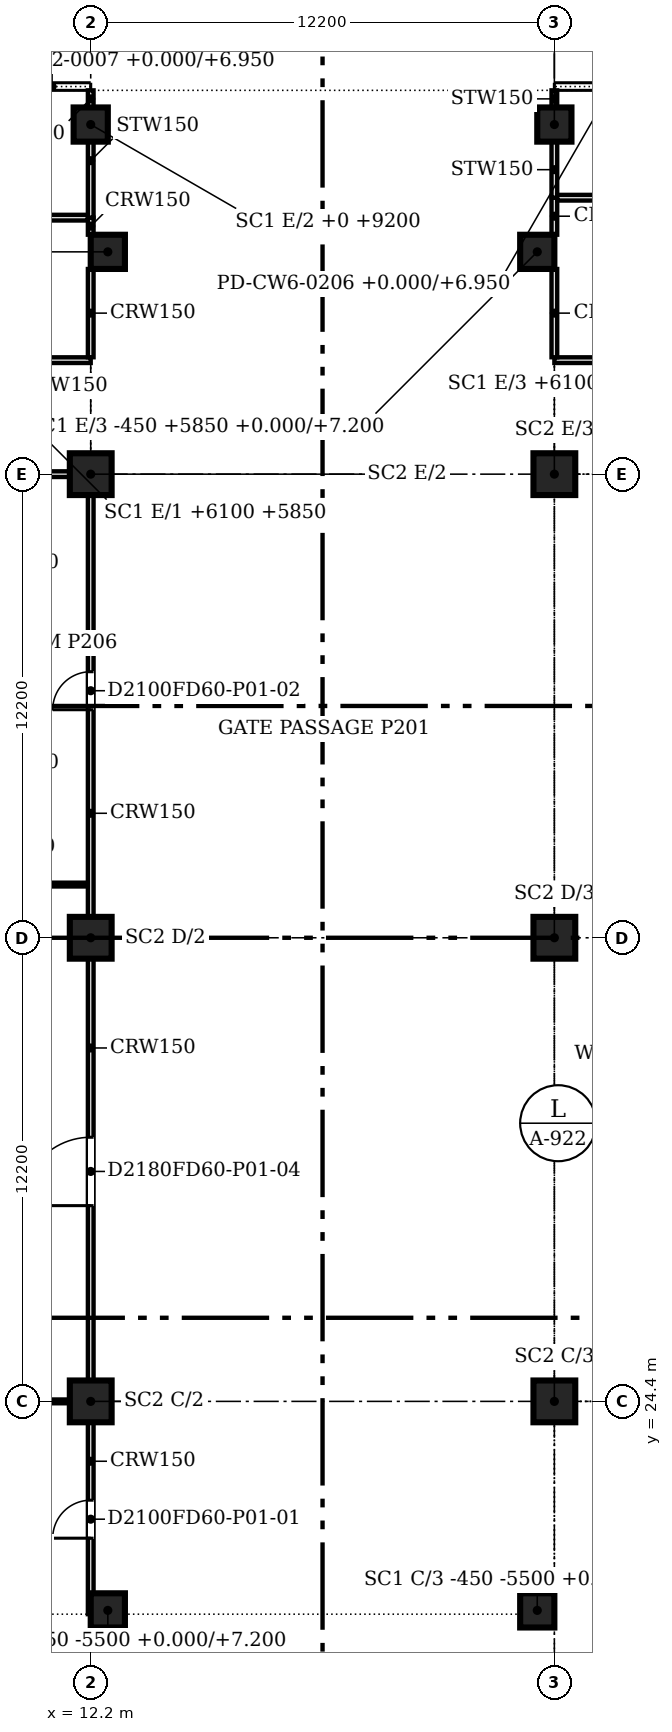
"""IFC4 building model, lengths in metres.
Left out: names, types, materials, properties, quantities, classifications, styles, units other than length and angle.
Written with IfcOpenShell. Run it as: python <this file> out.ifc"""

import sys

from ifc_helpers import new_model, si_unit, direction, frame, frame_2d, origin, origin_2d, place, context, subcontext, project, spatial, rectangle, extrude, faceted_brep, source, transform, mapped, element, fill, save


model = new_model("IFC4")
c1 = context("Model", 3, precision=1e-05, world=origin(), true_north=direction((0.0, 1.0)))
c2 = subcontext(c1, "Body", "Model", "MODEL_VIEW")
j1 = project(units=[si_unit("LENGTHUNIT", "METRE"), si_unit("PLANEANGLEUNIT", "RADIAN")], contexts=[c1])
p1 = place(None, origin())
s1 = spatial("IfcSite", under=j1, at=p1, CompositionType="ELEMENT")
p2 = place(p1, origin())
s2 = spatial("IfcBuilding", under=s1, at=p2, CompositionType="ELEMENT")
p3 = place(p2, origin())
s3 = spatial("IfcBuildingStorey", under=s2, at=p3, CompositionType="ELEMENT", Elevation=0.0)
for number, where, z_axis, x_axis in (
    (1, (12.65, 54.65, 0.0), (0.0, 0.0, 1.0), (1.0, 0.0, 0.0)),
    (2, (23.95, 54.65, 0.0), (0.0, 0.0, 1.0), (1.0, 0.0, 0.0)),
):
    element("IfcColumn", number, at=place(p3, frame(where, z_axis=z_axis, x_axis=x_axis)), inside=s3, PredefinedType="COLUMN", context=c2, shape_type="SweptSolid", body=[
        extrude(rectangle(XDim=0.9, YDim=0.9, at=origin_2d()), origin(), (0.0, 0.0, 1.0), 7.2),
    ])
for number, where, z_axis, x_axis in (
    (3, (12.2, 24.4, 0.0), (0.0, 0.0, 1.0), (1.0, 0.0, 0.0)),
    (4, (12.2, 36.6, 0.0), (0.0, 0.0, 1.0), (1.0, 0.0, 0.0)),
    (5, (12.2, 48.8, 0.0), (0.0, 0.0, 1.0), (1.0, 0.0, 0.0)),
    (6, (24.4, 24.4, 0.0), (0.0, 0.0, 1.0), (1.0, 0.0, 0.0)),
    (7, (24.4, 36.6, 0.0), (0.0, 0.0, 1.0), (1.0, 0.0, 0.0)),
    (8, (24.4, 48.8, 0.0), (0.0, 0.0, 1.0), (1.0, 0.0, 0.0)),
):
    element("IfcColumn", number, at=place(p3, frame(where, z_axis=z_axis, x_axis=x_axis)), inside=s3, PredefinedType="COLUMN", context=c2, shape_type="SweptSolid", body=[
        extrude(rectangle(XDim=1.1, YDim=1.1, at=origin_2d()), origin(), (0.0, 0.0, 1.0), 6.95),
    ])
for number, where, z_axis, x_axis in (
    (9, (12.2, 58.0, 0.0), (0.0, 0.0, 1.0), (1.0, 0.0, 0.0)),
    (10, (24.4, 58.0, 0.0), (0.0, 0.0, 1.0), (1.0, 0.0, 0.0)),
):
    element("IfcColumn", number, at=place(p3, frame(where, z_axis=z_axis, x_axis=x_axis)), inside=s3, PredefinedType="COLUMN", context=c2, shape_type="SweptSolid", body=[
        extrude(rectangle(XDim=0.9, YDim=0.9, at=origin_2d()), origin(), (0.0, 0.0, 1.0), 6.95),
    ])
for number, where, z_axis, x_axis in (
    (11, (12.65, 18.9, 0.0), (0.0, 0.0, 1.0), (1.0, 0.0, 0.0)),
    (12, (23.95, 18.9, 0.0), (0.0, 0.0, 1.0), (1.0, 0.0, 0.0)),
):
    element("IfcColumn", number, at=place(p3, frame(where, z_axis=z_axis, x_axis=x_axis)), inside=s3, PredefinedType="COLUMN", context=c2, shape_type="SweptSolid", body=[
        extrude(rectangle(XDim=0.9, YDim=0.9, at=origin_2d()), origin(), (0.0, 0.0, 1.0), 7.2),
    ])
p4 = place(p2, frame((0.0, 0.0, 7.2)))
s4 = spatial("IfcBuildingStorey", under=s2, at=p4, CompositionType="ELEMENT", Elevation=7.2)
m1 = source(origin(), c2, "Body", "Brep", [
    faceted_brep([(0.0, -0.25, 0.0), (6.053, -0.25, 0.0), (6.053, -0.25, 16.8), (0.0, -0.25, 16.8), (0.047, 0.25, 16.8), (6.053, 0.25, 16.8), (6.053, 0.25, 0.0), (0.047, 0.25, 0.0), (0.0, 0.0, 0.0), (0.0, 0.0, 16.8)], [[[0, 1, 2, 3]], [[4, 5, 6, 7]], [[7, 6, 1, 0, 8]], [[5, 4, 9, 3, 2]], [[8, 0, 3, 9]], [[7, 8, 9, 4]], [[1, 6, 5, 2]]]),
])
p5 = place(p4, frame((6.146, 18.55, -7.2), z_axis=(0.0, 0.0, 1.0), x_axis=(1.0, 0.0, 0.0)))
e13 = element("IfcWall", 13, at=p5, inside=s4, PredefinedType="SOLIDWALL", context=c2, shape_type="MappedRepresentation", body=[
    mapped(m1, transform((0.0, 0.0, 0.0), scale=1.0)),
])
p6 = place(p3, frame((12.2, 18.8, 0.0), z_axis=(0.0, 0.0, 1.0), x_axis=(0.0, 1.0, 0.0)))
e14 = element("IfcWall", 14, at=p6, inside=s3, PredefinedType="PARTITIONING", context=c2, shape_type="SweptSolid", body=[
    extrude(rectangle(XDim=5.049, YDim=0.15, at=frame_2d((2.524, 0.0))), origin(), (0.0, 0.0, 1.0), 6.115),
])
m2 = source(origin(), c2, "Body", "SweptSolid", [
    extrude(rectangle(XDim=1.0, YDim=2.1, at=frame_2d((0.5, 1.05))), frame((0.0, 0.085, 0.0), z_axis=(0.0, -1.0, 0.0), x_axis=(1.0, 0.0, 0.0)), (0.0, 0.0, 1.0), 0.17),
])
p7 = place(p6, frame((2.0, 0.0, 0.0)))
e15 = element("IfcOpeningElement", 15, at=p7, cuts=e14, PredefinedType="OPENING", context=c2, shape_type="MappedRepresentation", body=[
    mapped(m2, transform((0.0, 0.0, 0.0), scale=1.0)),
])
p8 = place(p3, frame((0.536, 24.4, 0.0), z_axis=(0.0, 0.0, 1.0), x_axis=(1.0, 0.0, 0.0)))
e16 = element("IfcWall", 16, at=p8, inside=s3, PredefinedType="PARTITIONING", context=c2, shape_type="SweptSolid", body=[
    extrude(rectangle(XDim=11.113, YDim=0.1, at=frame_2d((5.557, 0.0))), origin(), (0.0, 0.0, 1.0), 6.115),
])
p9 = place(p3, frame((12.2, 24.951, 0.0), z_axis=(0.0, 0.0, 1.0), x_axis=(0.0, 1.0, 0.0)))
e17 = element("IfcWall", 17, at=p9, inside=s3, PredefinedType="PARTITIONING", context=c2, shape_type="SweptSolid", body=[
    extrude(rectangle(XDim=11.098, YDim=0.15, at=frame_2d((5.549, 0.0))), origin(), (0.0, 0.0, 1.0), 6.115),
])
m3 = source(origin(), c2, "Body", "SweptSolid", [
    extrude(rectangle(XDim=1.8, YDim=2.1, at=frame_2d((0.9, 1.05))), frame((0.0, 0.085, 0.0), z_axis=(0.0, -1.0, 0.0), x_axis=(1.0, 0.0, 0.0)), (0.0, 0.0, 1.0), 0.17),
])
p10 = place(p9, frame((4.6, 0.0, 0.0)))
e18 = element("IfcOpeningElement", 18, at=p10, cuts=e17, PredefinedType="OPENING", context=c2, shape_type="MappedRepresentation", body=[
    mapped(m3, transform((0.0, 0.0, 0.0), scale=1.0)),
])
p11 = place(p3, frame((12.2, 37.151, 0.0), z_axis=(0.0, 0.0, 1.0), x_axis=(0.0, 1.0, 0.0)))
e19 = element("IfcWall", 19, at=p11, inside=s3, PredefinedType="PARTITIONING", context=c2, shape_type="SweptSolid", body=[
    extrude(rectangle(XDim=11.098, YDim=0.15, at=frame_2d((5.549, 0.0))), origin(), (0.0, 0.0, 1.0), 6.115),
])
p12 = place(p11, frame((5.45, 0.0, 0.0)))
e20 = element("IfcOpeningElement", 20, at=p12, cuts=e19, PredefinedType="OPENING", context=c2, shape_type="MappedRepresentation", body=[
    mapped(m2, transform((0.0, 0.0, 0.0), scale=1.0)),
])
p13 = place(p3, frame((4.0, 38.0, 0.0), z_axis=(0.0, 0.0, 1.0), x_axis=(1.0, 0.0, 0.0)))
e21 = element("IfcWall", 21, at=p13, inside=s3, PredefinedType="PARTITIONING", context=c2, shape_type="SweptSolid", body=[
    extrude(rectangle(XDim=8.124, YDim=0.1, at=frame_2d((4.062, 0.0))), origin(), (0.0, 0.0, 1.0), 6.115),
])
p14 = place(p3, frame((4.0, 48.8, 0.0), z_axis=(0.0, 0.0, 1.0), x_axis=(1.0, 0.0, 0.0)))
e22 = element("IfcWall", 22, at=p14, inside=s3, PredefinedType="PARTITIONING", context=c2, shape_type="SweptSolid", body=[
    extrude(rectangle(XDim=7.649, YDim=0.15, at=frame_2d((3.824, 0.0))), origin(), (0.0, 0.0, 1.0), 6.115),
])
p15 = place(p3, frame((1.725, 51.8, 0.0), z_axis=(0.0, 0.0, 1.0), x_axis=(1.0, 0.0, 0.0)))
e23 = element("IfcWall", 23, at=p15, inside=s3, PredefinedType="PARTITIONING", context=c2, shape_type="SweptSolid", body=[
    extrude(rectangle(XDim=10.475, YDim=0.15, at=frame_2d((5.237, 0.0))), origin(), (0.0, 0.0, 1.0), 6.115),
])
p16 = place(p15, frame((4.3, 0.0, 0.0)))
e24 = element("IfcOpeningElement", 24, at=p16, cuts=e23, PredefinedType="OPENING", context=c2, shape_type="MappedRepresentation", body=[
    mapped(m3, transform((0.0, 0.0, 0.0), scale=1.0)),
])
p17 = place(p3, frame((24.4, 51.8, 0.0), z_axis=(0.0, 0.0, 1.0), x_axis=(1.0, 0.0, 0.0)))
e25 = element("IfcWall", 25, at=p17, inside=s3, PredefinedType="PARTITIONING", context=c2, shape_type="SweptSolid", body=[
    extrude(rectangle(XDim=34.818, YDim=0.15, at=frame_2d((17.409, 0.0))), origin(), (0.0, 0.0, 1.0), 6.115),
])
p18 = place(p17, frame((15.801, 0.0, 0.0)))
e26 = element("IfcOpeningElement", 26, at=p18, cuts=e25, PredefinedType="OPENING", context=c2, shape_type="MappedRepresentation", body=[
    mapped(m3, transform((0.0, 0.0, 0.0), scale=1.0)),
])
p19 = place(p17, frame((5.2, 0.0, 0.0)))
e27 = element("IfcOpeningElement", 27, at=p19, cuts=e25, PredefinedType="OPENING", context=c2, shape_type="MappedRepresentation", body=[
    mapped(m3, transform((0.0, 0.0, 0.0), scale=1.0)),
])
p20 = place(p17, frame((27.1, 0.0, 0.0)))
e28 = element("IfcOpeningElement", 28, at=p20, cuts=e25, PredefinedType="OPENING", context=c2, shape_type="MappedRepresentation", body=[
    mapped(m3, transform((0.0, 0.0, 0.0), scale=1.0)),
])
for number, where, z_axis, x_axis in (
    (29, (12.2, 51.876, 0.0), (0.0, 0.0, 1.0), (0.0, 1.0, 0.0)),
    (30, (24.4, 51.876, 0.0), (0.0, 0.0, 1.0), (0.0, 1.0, 0.0)),
):
    element("IfcWall", number, at=place(p3, frame(where, z_axis=z_axis, x_axis=x_axis)), inside=s3, PredefinedType="PARTITIONING", context=c2, shape_type="SweptSolid", body=[
        extrude(rectangle(XDim=2.323, YDim=0.15, at=frame_2d((1.162, 0.0))), origin(), (0.0, 0.0, 1.0), 6.115),
    ])
p21 = place(p3, frame((12.2, 55.101, 0.0), z_axis=(0.0, 0.0, 1.0), x_axis=(0.0, 1.0, 0.0)))
e31 = element("IfcWall", 31, at=p21, inside=s3, PredefinedType="PARTITIONING", context=c2, shape_type="SweptSolid", body=[
    extrude(rectangle(XDim=0.449, YDim=0.15, at=frame_2d((0.225, 0.0))), origin(), (0.0, 0.0, 1.0), 6.115),
])
p22 = place(p3, frame((24.4, 55.101, 0.0), z_axis=(0.0, 0.0, 1.0), x_axis=(0.0, 1.0, 0.0)))
e32 = element("IfcWall", 32, at=p22, inside=s3, PredefinedType="PARTITIONING", context=c2, shape_type="SweptSolid", body=[
    extrude(rectangle(XDim=0.974, YDim=0.15, at=frame_2d((0.487, 0.0))), origin(), (0.0, 0.0, 1.0), 6.115),
])
p23 = place(p3, frame((0.5, 55.55, 0.0), z_axis=(0.0, 0.0, 1.0), x_axis=(1.0, 0.0, 0.0)))
e33 = element("IfcWall", 33, at=p23, inside=s3, PredefinedType="PARTITIONING", context=c2, shape_type="SweptSolid", body=[
    extrude(rectangle(XDim=11.624, YDim=0.15, at=frame_2d((5.812, 0.0))), origin(), (0.0, 0.0, 1.0), 6.115),
])
m4 = source(origin(), c2, "Body", "SweptSolid", [
    extrude(rectangle(XDim=0.9, YDim=2.1, at=frame_2d((0.45, 1.05))), frame((0.0, 0.085, 0.0), z_axis=(0.0, -1.0, 0.0), x_axis=(1.0, 0.0, 0.0)), (0.0, 0.0, 1.0), 0.17),
])
p24 = place(p23, frame((6.1, 0.0, 0.0)))
e34 = element("IfcOpeningElement", 34, at=p24, cuts=e33, PredefinedType="OPENING", context=c2, shape_type="MappedRepresentation", body=[
    mapped(m4, transform((0.0, 0.0, 0.0), scale=1.0)),
])
p25 = place(p3, frame((12.2, 55.551, 0.0), z_axis=(0.0, 0.0, 1.0), x_axis=(0.0, 1.0, 0.0)))
e35 = element("IfcWall", 35, at=p25, inside=s3, PredefinedType="PARTITIONING", context=c2, shape_type="SweptSolid", body=[
    extrude(rectangle(XDim=1.998, YDim=0.15, at=frame_2d((0.999, 0.0))), origin(), (0.0, 0.0, 1.0), 6.115),
])
p26 = place(p3, frame((24.4, 56.076, 0.0), z_axis=(0.0, 0.0, 1.0), x_axis=(0.0, 1.0, 0.0)))
e36 = element("IfcWall", 36, at=p26, inside=s3, PredefinedType="PARTITIONING", context=c2, shape_type="SweptSolid", body=[
    extrude(rectangle(XDim=1.473, YDim=0.15, at=frame_2d((0.737, 0.0))), origin(), (0.0, 0.0, 1.0), 6.115),
])
p27 = place(p3, frame((24.476, 56.075, 0.0), z_axis=(0.0, 0.0, 1.0), x_axis=(1.0, 0.0, 0.0)))
e37 = element("IfcWall", 37, at=p27, inside=s3, PredefinedType="PARTITIONING", context=c2, shape_type="SweptSolid", body=[
    extrude(rectangle(XDim=21.124, YDim=0.15, at=frame_2d((10.562, 0.0))), origin(), (0.0, 0.0, 1.0), 6.115),
])
p28 = place(p27, frame((16.125, 0.0, 0.0)))
e38 = element("IfcOpeningElement", 38, at=p28, cuts=e37, PredefinedType="OPENING", context=c2, shape_type="MappedRepresentation", body=[
    mapped(m4, transform((0.0, 0.0, 0.0), scale=1.0)),
])
p29 = place(p27, frame((6.5, 0.0, 0.0)))
e39 = element("IfcOpeningElement", 39, at=p29, cuts=e37, PredefinedType="OPENING", context=c2, shape_type="MappedRepresentation", body=[
    mapped(m4, transform((0.0, 0.0, 0.0), scale=1.0)),
])
for number, where, z_axis, x_axis in (
    (40, (12.2, 58.451, 0.0), (0.0, 0.0, 1.0), (0.0, 1.0, 0.0)),
    (41, (24.4, 58.451, 0.0), (0.0, 0.0, 1.0), (0.0, 1.0, 0.0)),
):
    element("IfcWall", number, at=place(p3, frame(where, z_axis=z_axis, x_axis=x_axis)), inside=s3, PredefinedType="PARTITIONING", context=c2, shape_type="SweptSolid", body=[
        extrude(rectangle(XDim=0.449, YDim=0.15, at=frame_2d((0.225, 0.0))), origin(), (0.0, 0.0, 1.0), 6.115),
    ])
m5 = source(origin(), c2, "Body", "SweptSolid", [
    extrude(rectangle(XDim=1.0, YDim=2.1, at=frame_2d((0.5, 1.05))), frame((0.0, 0.025, 0.0), z_axis=(0.0, -1.0, 0.0), x_axis=(1.0, 0.0, 0.0)), (0.0, 0.0, 1.0), 0.05),
])
p30 = place(p7, origin())
e42 = element("IfcDoor", 42, at=p30, inside=s3, OperationType="SINGLE_SWING_LEFT", PredefinedType="DOOR", context=c2, shape_type="MappedRepresentation", body=[
    mapped(m5, transform((0.0, 0.0, 0.0), scale=1.0)),
])
fill(e15, e42)
p31 = place(p12, origin())
e43 = element("IfcDoor", 43, at=p31, inside=s3, OperationType="SINGLE_SWING_LEFT", PredefinedType="DOOR", context=c2, shape_type="MappedRepresentation", body=[
    mapped(m5, transform((0.0, 0.0, 0.0), scale=1.0)),
])
fill(e20, e43)
m6 = source(origin(), c2, "Body", "SweptSolid", [
    extrude(rectangle(XDim=1.8, YDim=2.1, at=frame_2d((0.9, 1.05))), frame((0.0, 0.025, 0.0), z_axis=(0.0, -1.0, 0.0), x_axis=(1.0, 0.0, 0.0)), (0.0, 0.0, 1.0), 0.05),
])
p32 = place(p10, origin())
e44 = element("IfcDoor", 44, at=p32, inside=s3, OperationType="DOUBLE_DOOR_SINGLE_SWING", PredefinedType="DOOR", context=c2, shape_type="MappedRepresentation", body=[
    mapped(m6, transform((0.0, 0.0, 0.0), scale=1.0)),
])
fill(e18, e44)
save(model, sys.argv[1])
